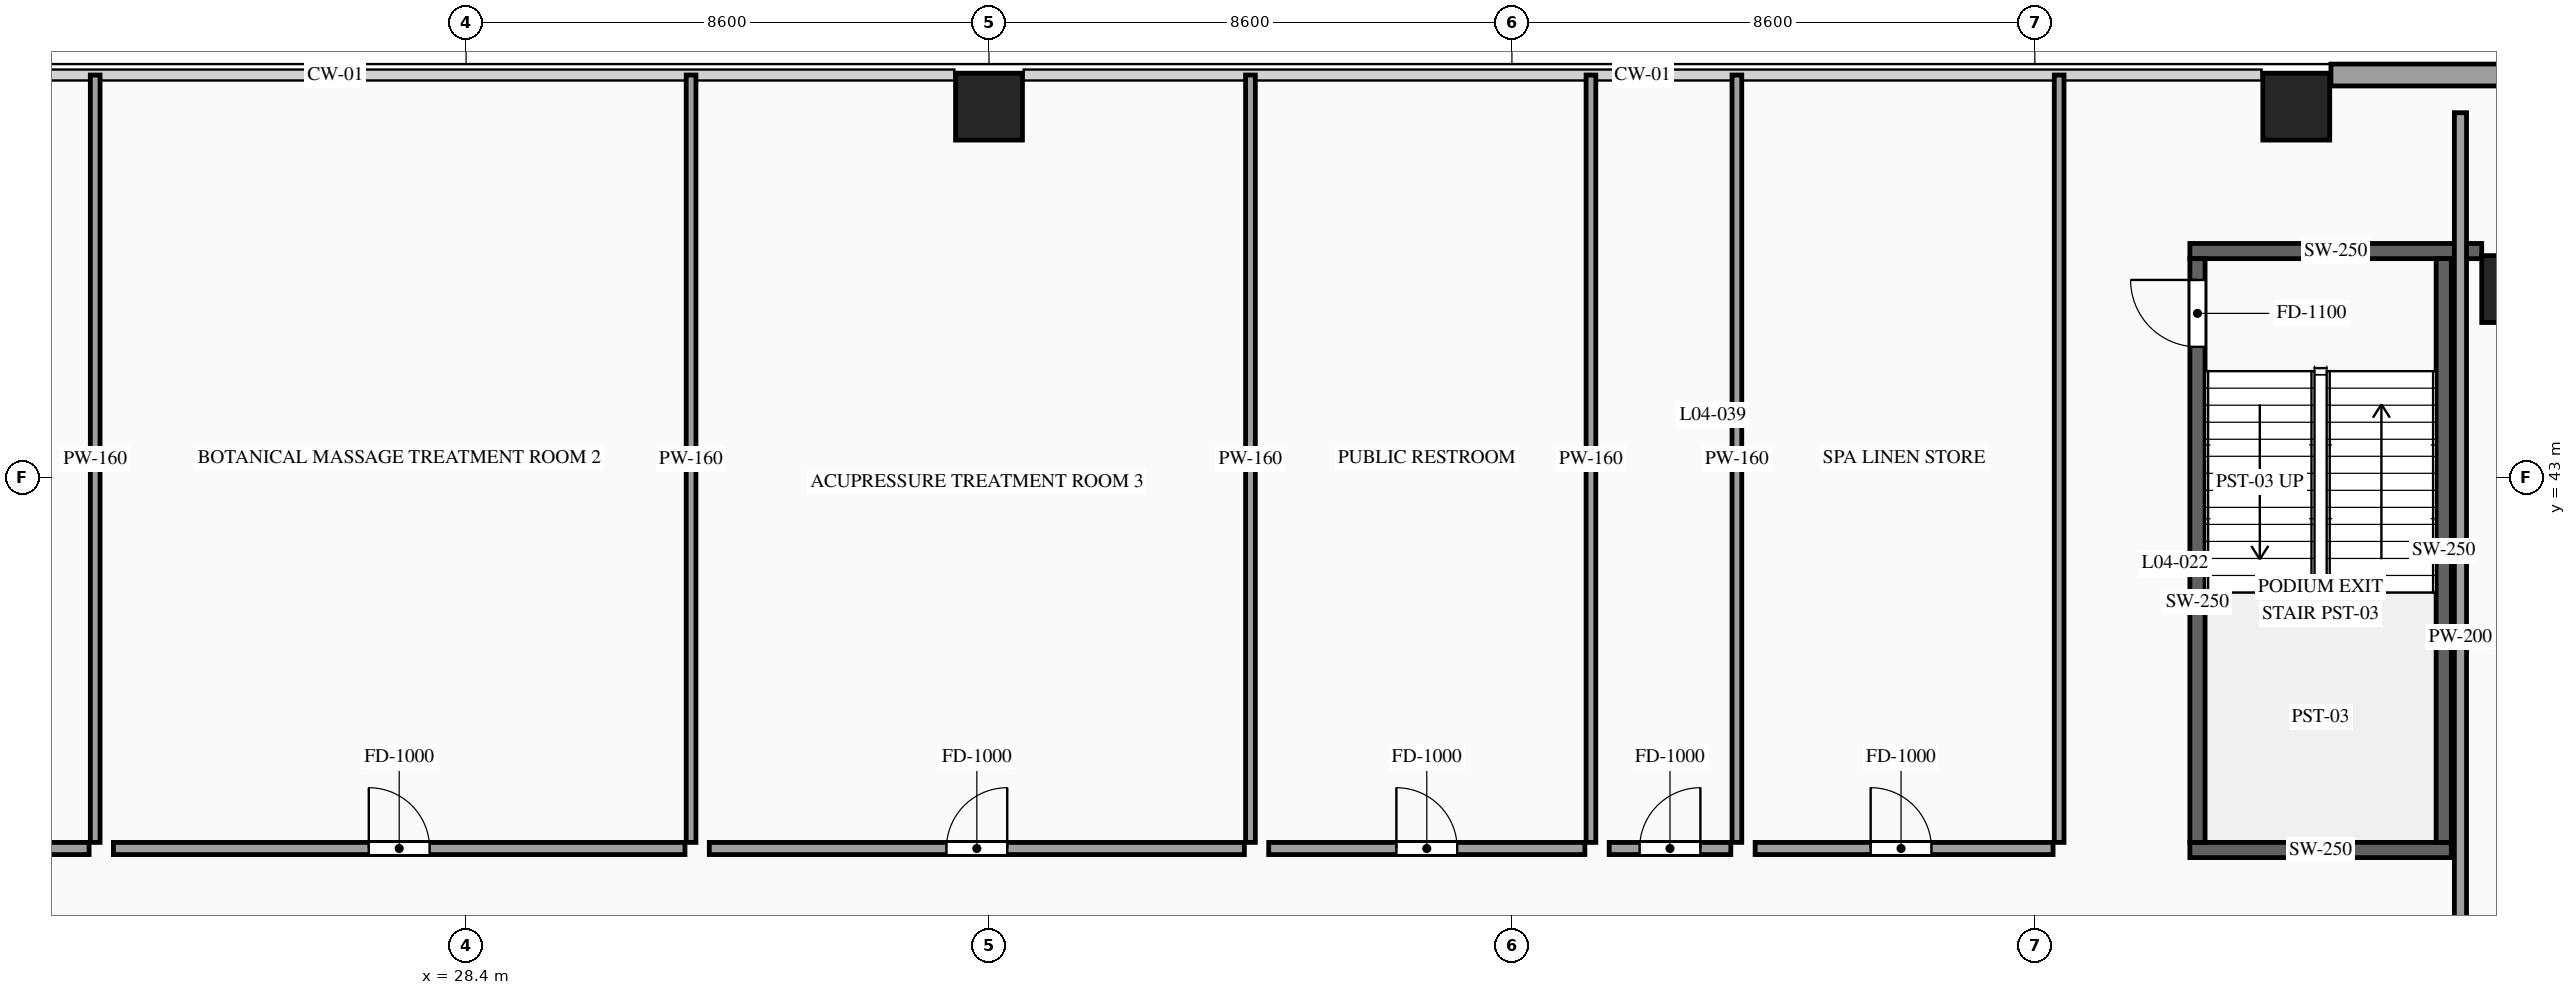
"""IFC4 building model, lengths in metres.
Left out: names, types, materials, properties, quantities, classifications, styles, units other than length and angle.
Written with IfcOpenShell. Run it as: python <this file> out.ifc"""

import sys

from ifc_helpers import new_model, si_unit, direction, frame, frame_2d, origin, origin_2d, place, context, subcontext, project, spatial, rectangle, extrude, source, transform, mapped, element, fill, save


model = new_model("IFC4")
c1 = context("Model", 3, precision=1e-05, world=origin(), true_north=direction((0.0, 1.0)))
c2 = subcontext(c1, "Body", "Model", "MODEL_VIEW")
j1 = project(units=[si_unit("LENGTHUNIT", "METRE"), si_unit("PLANEANGLEUNIT", "RADIAN")], contexts=[c1])
p1 = place(None, origin())
s1 = spatial("IfcSite", under=j1, at=p1, CompositionType="ELEMENT")
p2 = place(p1, origin())
s2 = spatial("IfcBuilding", under=s1, at=p2, CompositionType="ELEMENT")
p3 = place(p2, frame((0.0, 0.0, 15.0)))
s3 = spatial("IfcBuildingStorey", under=s2, at=p3, CompositionType="ELEMENT", Elevation=15.0)
m1 = source(origin(), c2, "Body", "SweptSolid", [
    extrude(rectangle(XDim=1.1, YDim=1.1, at=origin_2d()), origin(), (0.0, 0.0, 1.0), 4.8),
])
for number, where, z_axis, x_axis in (
    (1, (62.1, 46.1, 0.0), (0.0, 0.0, 1.0), (1.0, 0.0, 0.0)),
    (2, (37.0, 49.1, 0.0), (0.0, 0.0, 1.0), (1.0, 0.0, 0.0)),
    (3, (58.5, 49.1, 0.0), (0.0, 0.0, 1.0), (1.0, 0.0, 0.0)),
):
    element("IfcColumn", number, at=place(p3, frame(where, z_axis=z_axis, x_axis=x_axis)), inside=s3, PredefinedType="COLUMN", context=c2, shape_type="MappedRepresentation", body=[
        mapped(m1, transform((0.0, 0.0, 0.0), scale=1.0)),
    ])
p4 = place(p3, frame((59.07, 49.62, 0.0), z_axis=(0.0, 0.0, 1.0), x_axis=(1.0, 0.0, 0.0)))
e4 = element("IfcWall", 4, at=p4, inside=s3, PredefinedType="SOLIDWALL", context=c2, shape_type="SweptSolid", body=[
    extrude(rectangle(XDim=12.93, YDim=0.36, at=frame_2d((6.465, 0.0))), origin(), (0.0, 0.0, 1.0), 4.52),
])
p5 = place(p4, frame((6.03, 0.0, 0.9)))
e5 = element("IfcOpeningElement", 5, at=p5, cuts=e4, PredefinedType="OPENING", context=c2, shape_type="SweptSolid", body=[
    extrude(rectangle(XDim=1.8, YDim=2.2, at=frame_2d((0.9, 1.1))), frame((0.0, 0.195, 0.0), z_axis=(0.0, -1.0, 0.0), x_axis=(1.0, 0.0, 0.0)), (0.0, 0.0, 1.0), 0.39),
])
m2 = source(origin(), c2, "Body", "SweptSolid", [
    extrude(rectangle(XDim=4.3, YDim=0.25, at=frame_2d((2.15, 0.0))), origin(), (0.0, 0.0, 1.0), 4.52),
])
p6 = place(p3, frame((56.75, 36.875, 0.0), z_axis=(0.0, 0.0, 1.0), x_axis=(1.0, 0.0, 0.0)))
e6 = element("IfcWall", 6, at=p6, inside=s3, PredefinedType="SOLIDWALL", context=c2, shape_type="MappedRepresentation", body=[
    mapped(m2, transform((0.0, 0.0, 0.0), scale=1.0)),
])
m3 = source(origin(), c2, "Body", "SweptSolid", [
    extrude(rectangle(XDim=4.8, YDim=0.25, at=frame_2d((2.4, 0.0))), origin(), (0.0, 0.0, 1.0), 4.52),
])
p7 = place(p3, frame((56.75, 46.725, 0.0), z_axis=(0.0, 0.0, 1.0), x_axis=(1.0, 0.0, 0.0)))
e7 = element("IfcWall", 7, at=p7, inside=s3, PredefinedType="SOLIDWALL", context=c2, shape_type="MappedRepresentation", body=[
    mapped(m3, transform((0.0, 0.0, 0.0), scale=1.0)),
])
p8 = place(p3, frame((56.875, 37.0, 0.0), z_axis=(0.0, 0.0, 1.0), x_axis=(0.0, 1.0, 0.0)))
e8 = element("IfcWall", 8, at=p8, inside=s3, PredefinedType="SOLIDWALL", context=c2, shape_type="SweptSolid", body=[
    extrude(rectangle(XDim=9.6, YDim=0.25, at=frame_2d((4.8, 0.0))), origin(), (0.0, 0.0, 1.0), 4.52),
])
p9 = place(p8, frame((8.15, 0.0, 0.0)))
e9 = element("IfcOpeningElement", 9, at=p9, cuts=e8, PredefinedType="OPENING", context=c2, shape_type="SweptSolid", body=[
    extrude(rectangle(XDim=1.1, YDim=2.2, at=frame_2d((0.55, 1.1))), frame((0.0, 0.14, 0.0), z_axis=(0.0, -1.0, 0.0), x_axis=(1.0, 0.0, 0.0)), (0.0, 0.0, 1.0), 0.28),
])
m4 = source(origin(), c2, "Body", "SweptSolid", [
    extrude(rectangle(XDim=9.6, YDim=0.25, at=frame_2d((4.8, 0.0))), origin(), (0.0, 0.0, 1.0), 4.52),
])
p10 = place(p3, frame((60.925, 37.0, 0.0), z_axis=(0.0, 0.0, 1.0), x_axis=(0.0, 1.0, 0.0)))
e10 = element("IfcWall", 10, at=p10, inside=s3, PredefinedType="SOLIDWALL", context=c2, shape_type="MappedRepresentation", body=[
    mapped(m4, transform((0.0, 0.0, 0.0), scale=1.0)),
])
p11 = place(p3, frame((61.2, 25.4, 0.0), z_axis=(0.0, 0.0, 1.0), x_axis=(0.0, 1.0, 0.0)))
e11 = element("IfcWall", 11, at=p11, inside=s3, PredefinedType="PARTITIONING", context=c2, shape_type="SweptSolid", body=[
    extrude(rectangle(XDim=23.6, YDim=0.2, at=frame_2d((11.8, 0.0))), origin(), (0.0, 0.0, 1.0), 4.52),
])
p12 = place(p11, frame((5.1, 0.0, 0.0)))
e12 = element("IfcOpeningElement", 12, at=p12, cuts=e11, PredefinedType="OPENING", context=c2, shape_type="SweptSolid", body=[
    extrude(rectangle(XDim=1.0, YDim=2.2, at=frame_2d((0.5, 1.1))), frame((0.0, 0.115, 0.0), z_axis=(0.0, -1.0, 0.0), x_axis=(1.0, 0.0, 0.0)), (0.0, 0.0, 1.0), 0.23),
])
p13 = place(p3, frame((12.6, 36.9, 0.0), z_axis=(0.0, 0.0, 1.0), x_axis=(1.0, 0.0, 0.0)))
e13 = element("IfcWall", 13, at=p13, inside=s3, PredefinedType="PARTITIONING", context=c2, shape_type="SweptSolid", body=[
    extrude(rectangle(XDim=9.6, YDim=0.2, at=frame_2d((4.8, 0.0))), origin(), (0.0, 0.0, 1.0), 4.52),
])
p14 = place(p13, frame((4.3, 0.0, 0.0)))
e14 = element("IfcOpeningElement", 14, at=p14, cuts=e13, PredefinedType="OPENING", context=c2, shape_type="SweptSolid", body=[
    extrude(rectangle(XDim=1.0, YDim=2.2, at=frame_2d((0.5, 1.1))), frame((0.0, 0.115, 0.0), z_axis=(0.0, -1.0, 0.0), x_axis=(1.0, 0.0, 0.0)), (0.0, 0.0, 1.0), 0.23),
])
m5 = source(origin(), c2, "Body", "SweptSolid", [
    extrude(rectangle(XDim=12.62, YDim=0.16, at=frame_2d((6.31, 0.0))), origin(), (0.0, 0.0, 1.0), 4.52),
])
p15 = place(p3, frame((22.3, 37.0, 0.0), z_axis=(0.0, 0.0, 1.0), x_axis=(0.0, 1.0, 0.0)))
e15 = element("IfcWall", 15, at=p15, inside=s3, PredefinedType="PARTITIONING", context=c2, shape_type="MappedRepresentation", body=[
    mapped(m5, transform((0.0, 0.0, 0.0), scale=1.0)),
])
p16 = place(p3, frame((22.6, 36.9, 0.0), z_axis=(0.0, 0.0, 1.0), x_axis=(1.0, 0.0, 0.0)))
e16 = element("IfcWall", 16, at=p16, inside=s3, PredefinedType="PARTITIONING", context=c2, shape_type="SweptSolid", body=[
    extrude(rectangle(XDim=9.4, YDim=0.2, at=frame_2d((4.7, 0.0))), origin(), (0.0, 0.0, 1.0), 4.52),
])
p17 = place(p16, frame((4.2, 0.0, 0.0)))
e17 = element("IfcOpeningElement", 17, at=p17, cuts=e16, PredefinedType="OPENING", context=c2, shape_type="SweptSolid", body=[
    extrude(rectangle(XDim=1.0, YDim=2.2, at=frame_2d((0.5, 1.1))), frame((0.0, 0.115, 0.0), z_axis=(0.0, -1.0, 0.0), x_axis=(1.0, 0.0, 0.0)), (0.0, 0.0, 1.0), 0.23),
])
p18 = place(p3, frame((32.1, 37.0, 0.0), z_axis=(0.0, 0.0, 1.0), x_axis=(0.0, 1.0, 0.0)))
e18 = element("IfcWall", 18, at=p18, inside=s3, PredefinedType="PARTITIONING", context=c2, shape_type="MappedRepresentation", body=[
    mapped(m5, transform((0.0, 0.0, 0.0), scale=1.0)),
])
p19 = place(p3, frame((32.4, 36.9, 0.0), z_axis=(0.0, 0.0, 1.0), x_axis=(1.0, 0.0, 0.0)))
e19 = element("IfcWall", 19, at=p19, inside=s3, PredefinedType="PARTITIONING", context=c2, shape_type="SweptSolid", body=[
    extrude(rectangle(XDim=8.8, YDim=0.2, at=frame_2d((4.4, 0.0))), origin(), (0.0, 0.0, 1.0), 4.52),
])
p20 = place(p19, frame((3.9, 0.0, 0.0)))
e20 = element("IfcOpeningElement", 20, at=p20, cuts=e19, PredefinedType="OPENING", context=c2, shape_type="SweptSolid", body=[
    extrude(rectangle(XDim=1.0, YDim=2.2, at=frame_2d((0.5, 1.1))), frame((0.0, 0.115, 0.0), z_axis=(0.0, -1.0, 0.0), x_axis=(1.0, 0.0, 0.0)), (0.0, 0.0, 1.0), 0.23),
])
p21 = place(p3, frame((41.3, 37.0, 0.0), z_axis=(0.0, 0.0, 1.0), x_axis=(0.0, 1.0, 0.0)))
e21 = element("IfcWall", 21, at=p21, inside=s3, PredefinedType="PARTITIONING", context=c2, shape_type="MappedRepresentation", body=[
    mapped(m5, transform((0.0, 0.0, 0.0), scale=1.0)),
])
p22 = place(p3, frame((41.6, 36.9, 0.0), z_axis=(0.0, 0.0, 1.0), x_axis=(1.0, 0.0, 0.0)))
e22 = element("IfcWall", 22, at=p22, inside=s3, PredefinedType="PARTITIONING", context=c2, shape_type="SweptSolid", body=[
    extrude(rectangle(XDim=5.2, YDim=0.2, at=frame_2d((2.6, 0.0))), origin(), (0.0, 0.0, 1.0), 4.52),
])
p23 = place(p22, frame((2.1, 0.0, 0.0)))
e23 = element("IfcOpeningElement", 23, at=p23, cuts=e22, PredefinedType="OPENING", context=c2, shape_type="SweptSolid", body=[
    extrude(rectangle(XDim=1.0, YDim=2.2, at=frame_2d((0.5, 1.1))), frame((0.0, 0.115, 0.0), z_axis=(0.0, -1.0, 0.0), x_axis=(1.0, 0.0, 0.0)), (0.0, 0.0, 1.0), 0.23),
])
p24 = place(p3, frame((46.9, 37.0, 0.0), z_axis=(0.0, 0.0, 1.0), x_axis=(0.0, 1.0, 0.0)))
e24 = element("IfcWall", 24, at=p24, inside=s3, PredefinedType="PARTITIONING", context=c2, shape_type="MappedRepresentation", body=[
    mapped(m5, transform((0.0, 0.0, 0.0), scale=1.0)),
])
p25 = place(p3, frame((47.2, 36.9, 0.0), z_axis=(0.0, 0.0, 1.0), x_axis=(1.0, 0.0, 0.0)))
e25 = element("IfcWall", 25, at=p25, inside=s3, PredefinedType="PARTITIONING", context=c2, shape_type="SweptSolid", body=[
    extrude(rectangle(XDim=2.0, YDim=0.2, at=frame_2d((1.0, 0.0))), origin(), (0.0, 0.0, 1.0), 4.52),
])
p26 = place(p25, frame((0.5, 0.0, 0.0)))
e26 = element("IfcOpeningElement", 26, at=p26, cuts=e25, PredefinedType="OPENING", context=c2, shape_type="SweptSolid", body=[
    extrude(rectangle(XDim=1.0, YDim=2.2, at=frame_2d((0.5, 1.1))), frame((0.0, 0.115, 0.0), z_axis=(0.0, -1.0, 0.0), x_axis=(1.0, 0.0, 0.0)), (0.0, 0.0, 1.0), 0.23),
])
p27 = place(p3, frame((49.3, 37.0, 0.0), z_axis=(0.0, 0.0, 1.0), x_axis=(0.0, 1.0, 0.0)))
e27 = element("IfcWall", 27, at=p27, inside=s3, PredefinedType="PARTITIONING", context=c2, shape_type="MappedRepresentation", body=[
    mapped(m5, transform((0.0, 0.0, 0.0), scale=1.0)),
])
p28 = place(p3, frame((49.6, 36.9, 0.0), z_axis=(0.0, 0.0, 1.0), x_axis=(1.0, 0.0, 0.0)))
e28 = element("IfcWall", 28, at=p28, inside=s3, PredefinedType="PARTITIONING", context=c2, shape_type="SweptSolid", body=[
    extrude(rectangle(XDim=4.9, YDim=0.2, at=frame_2d((2.45, 0.0))), origin(), (0.0, 0.0, 1.0), 4.52),
])
p29 = place(p28, frame((1.9, 0.0, 0.0)))
e29 = element("IfcOpeningElement", 29, at=p29, cuts=e28, PredefinedType="OPENING", context=c2, shape_type="SweptSolid", body=[
    extrude(rectangle(XDim=1.0, YDim=2.2, at=frame_2d((0.5, 1.1))), frame((0.0, 0.115, 0.0), z_axis=(0.0, -1.0, 0.0), x_axis=(1.0, 0.0, 0.0)), (0.0, 0.0, 1.0), 0.23),
])
p30 = place(p3, frame((54.6, 37.0, 0.0), z_axis=(0.0, 0.0, 1.0), x_axis=(0.0, 1.0, 0.0)))
e30 = element("IfcWall", 30, at=p30, inside=s3, PredefinedType="PARTITIONING", context=c2, shape_type="MappedRepresentation", body=[
    mapped(m5, transform((0.0, 0.0, 0.0), scale=1.0)),
])
m6 = source(origin(), c2, "Body", "SweptSolid", [
    extrude(rectangle(XDim=1.1, YDim=2.2, at=frame_2d((0.55, 1.1))), frame((0.0, 0.025, 0.0), z_axis=(0.0, -1.0, 0.0), x_axis=(1.0, 0.0, 0.0)), (0.0, 0.0, 1.0), 0.05),
])
p31 = place(p9, origin())
e31 = element("IfcDoor", 31, at=p31, inside=s3, OperationType="SINGLE_SWING_RIGHT", PredefinedType="DOOR", context=c2, shape_type="MappedRepresentation", body=[
    mapped(m6, transform((0.0, 0.0, 0.0), scale=1.0)),
])
fill(e9, e31)
m7 = source(origin(), c2, "Body", "SweptSolid", [
    extrude(rectangle(XDim=1.0, YDim=2.2, at=frame_2d((0.5, 1.1))), frame((0.0, 0.025, 0.0), z_axis=(0.0, -1.0, 0.0), x_axis=(1.0, 0.0, 0.0)), (0.0, 0.0, 1.0), 0.05),
])
p32 = place(p17, origin())
e32 = element("IfcDoor", 32, at=p32, inside=s3, OperationType="SINGLE_SWING_LEFT", PredefinedType="DOOR", context=c2, shape_type="MappedRepresentation", body=[
    mapped(m7, transform((0.0, 0.0, 0.0), scale=1.0)),
])
fill(e17, e32)
p33 = place(p20, origin())
e33 = element("IfcDoor", 33, at=p33, inside=s3, OperationType="SINGLE_SWING_RIGHT", PredefinedType="DOOR", context=c2, shape_type="MappedRepresentation", body=[
    mapped(m7, transform((0.0, 0.0, 0.0), scale=1.0)),
])
fill(e20, e33)
p34 = place(p23, origin())
e34 = element("IfcDoor", 34, at=p34, inside=s3, OperationType="SINGLE_SWING_LEFT", PredefinedType="DOOR", context=c2, shape_type="MappedRepresentation", body=[
    mapped(m7, transform((0.0, 0.0, 0.0), scale=1.0)),
])
fill(e23, e34)
p35 = place(p26, origin())
e35 = element("IfcDoor", 35, at=p35, inside=s3, OperationType="SINGLE_SWING_RIGHT", PredefinedType="DOOR", context=c2, shape_type="MappedRepresentation", body=[
    mapped(m7, transform((0.0, 0.0, 0.0), scale=1.0)),
])
fill(e26, e35)
p36 = place(p29, origin())
e36 = element("IfcDoor", 36, at=p36, inside=s3, OperationType="SINGLE_SWING_LEFT", PredefinedType="DOOR", context=c2, shape_type="MappedRepresentation", body=[
    mapped(m7, transform((0.0, 0.0, 0.0), scale=1.0)),
])
fill(e29, e36)
save(model, sys.argv[1])
